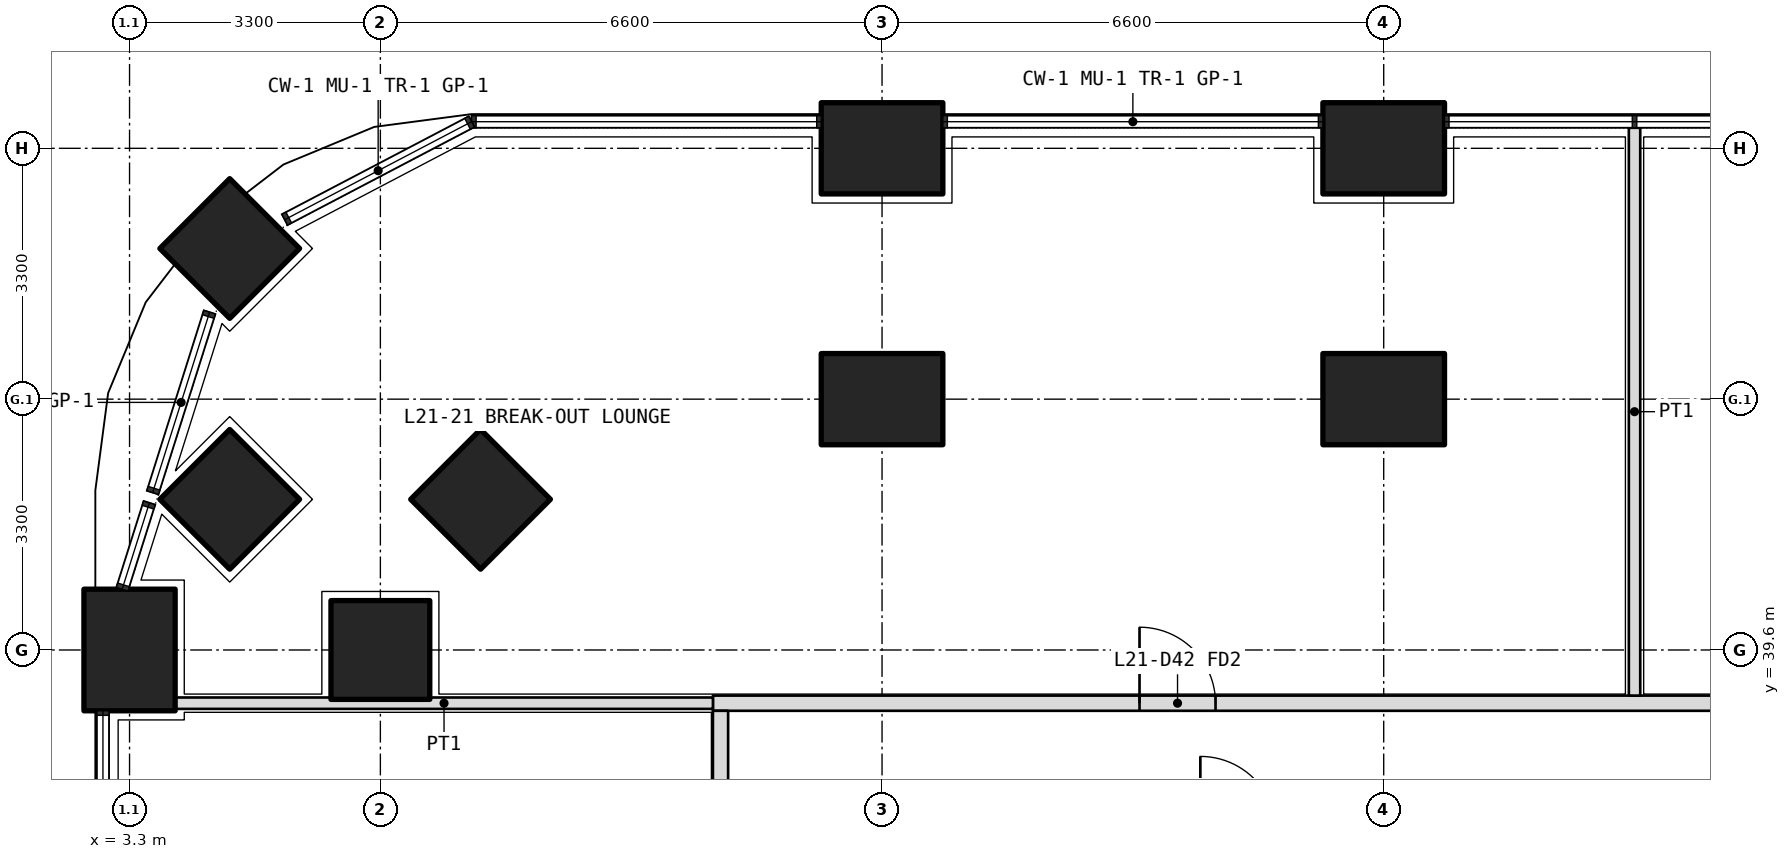
"""IFC4 building model, lengths in metres.
Left out: names, types, materials, properties, quantities, classifications, styles, units other than length and angle.
Written with IfcOpenShell. Run it as: python <this file> out.ifc"""

import sys

from ifc_helpers import new_model, si_unit, direction, frame, frame_2d, origin, origin_2d, place, context, subcontext, project, spatial, rectangle, extrude, element, fill, save


model = new_model("IFC4")
c1 = context("Model", 3, precision=1e-05, world=origin(), true_north=direction((0.0, 1.0)))
c2 = subcontext(c1, "Body", "Model", "MODEL_VIEW")
j1 = project(units=[si_unit("LENGTHUNIT", "METRE"), si_unit("PLANEANGLEUNIT", "RADIAN")], contexts=[c1])
p1 = place(None, origin())
s1 = spatial("IfcSite", under=j1, at=p1, CompositionType="ELEMENT")
p2 = place(p1, origin())
s2 = spatial("IfcBuilding", under=s1, at=p2, CompositionType="ELEMENT")
p3 = place(p2, frame((0.0, 0.0, 94.8)))
s3 = spatial("IfcBuildingStorey", under=s2, at=p3, CompositionType="ELEMENT", Elevation=94.8)
p4 = place(p3, frame((4.618, 44.882, 0.0), z_axis=(0.0, 0.0, 1.0), x_axis=(0.707106781187, 0.707106781187, 0.0)))
e1 = element("IfcColumn", 1, at=p4, inside=s3, PredefinedType="COLUMN", context=c2, shape_type="SweptSolid", body=[
    extrude(rectangle(XDim=1.3, YDim=1.3, at=origin_2d()), origin(), (0.0, 0.0, 1.0), 4.2),
])
for number, where, z_axis, x_axis in (
    (2, (3.3, 39.6, 0.0), (0.0, 0.0, 1.0), (0.0, 1.0, 0.0)),
    (3, (13.2, 46.2, 0.0), (0.0, 0.0, 1.0), (1.0, 0.0, 0.0)),
    (4, (19.8, 46.2, 0.0), (0.0, 0.0, 1.0), (1.0, 0.0, 0.0)),
):
    element("IfcColumn", number, at=place(p3, frame(where, z_axis=z_axis, x_axis=x_axis)), inside=s3, PredefinedType="COLUMN", context=c2, shape_type="SweptSolid", body=[
        extrude(rectangle(XDim=1.6, YDim=1.2, at=origin_2d()), origin(), (0.0, 0.0, 1.0), 4.2),
    ])
for number, where, z_axis, x_axis in (
    (5, (6.6, 39.6, 0.0), (0.0, 0.0, 1.0), (1.0, 0.0, 0.0)),
    (6, (4.618, 41.582, 0.0), (0.0, 0.0, 1.0), (0.707, 0.707, 0.0)),
):
    element("IfcColumn", number, at=place(p3, frame(where, z_axis=z_axis, x_axis=x_axis)), inside=s3, PredefinedType="COLUMN", context=c2, shape_type="SweptSolid", body=[
        extrude(rectangle(XDim=1.3, YDim=1.3, at=origin_2d()), origin(), (0.0, 0.0, 1.0), 4.2),
    ])
for number, where, z_axis, x_axis in (
    (7, (13.2, 42.9, 0.0), (0.0, 0.0, 1.0), (1.0, 0.0, 0.0)),
    (8, (19.8, 42.9, 0.0), (0.0, 0.0, 1.0), (1.0, 0.0, 0.0)),
):
    element("IfcColumn", number, at=place(p3, frame(where, z_axis=z_axis, x_axis=x_axis)), inside=s3, PredefinedType="COLUMN", context=c2, shape_type="SweptSolid", body=[
        extrude(rectangle(XDim=1.6, YDim=1.2, at=origin_2d()), origin(), (0.0, 0.0, 1.0), 4.2),
    ])
p5 = place(p3, frame((7.918, 41.582, 0.0), z_axis=(0.0, 0.0, 1.0), x_axis=(0.707106781187, 0.707106781187, 0.0)))
e9 = element("IfcColumn", 9, at=p5, inside=s3, PredefinedType="COLUMN", context=c2, shape_type="SweptSolid", body=[
    extrude(rectangle(XDim=1.3, YDim=1.3, at=origin_2d()), origin(), (0.0, 0.0, 1.0), 4.2),
])
p6 = place(p3, frame((10.975, 38.9, 0.0), z_axis=(0.0, 0.0, 1.0), x_axis=(1.0, 0.0, 0.0)))
e10 = element("IfcWall", 10, at=p6, inside=s3, PredefinedType="PARTITIONING", context=c2, shape_type="SweptSolid", body=[
    extrude(rectangle(XDim=30.85, YDim=0.2, at=frame_2d((15.425, 0.0))), origin(), (0.0, 0.0, 1.0), 2.85),
])
p7 = place(p6, frame((5.613, 0.0, 0.0)))
e11 = element("IfcOpeningElement", 11, at=p7, cuts=e10, PredefinedType="OPENING", context=c2, shape_type="SweptSolid", body=[
    extrude(rectangle(XDim=1.0, YDim=2.1, at=frame_2d((0.5, 1.05))), frame((0.0, 0.11, 0.0), z_axis=(0.0, -1.0, 0.0), x_axis=(1.0, 0.0, 0.0)), (0.0, 0.0, 1.0), 0.22),
])
p8 = place(p6, frame((16.575, 0.0, 0.0)))
e12 = element("IfcOpeningElement", 12, at=p8, cuts=e10, PredefinedType="OPENING", context=c2, shape_type="SweptSolid", body=[
    extrude(rectangle(XDim=1.0, YDim=2.1, at=frame_2d((0.5, 1.05))), frame((0.0, 0.11, 0.0), z_axis=(0.0, -1.0, 0.0), x_axis=(1.0, 0.0, 0.0)), (0.0, 0.0, 1.0), 0.22),
])
p9 = place(p6, frame((23.175, 0.0, 0.0)))
e13 = element("IfcOpeningElement", 13, at=p9, cuts=e10, PredefinedType="OPENING", context=c2, shape_type="SweptSolid", body=[
    extrude(rectangle(XDim=1.0, YDim=2.1, at=frame_2d((0.5, 1.05))), frame((0.0, 0.11, 0.0), z_axis=(0.0, -1.0, 0.0), x_axis=(1.0, 0.0, 0.0)), (0.0, 0.0, 1.0), 0.22),
])
p10 = place(p6, frame((27.538, 0.0, 0.0)))
e14 = element("IfcOpeningElement", 14, at=p10, cuts=e10, PredefinedType="OPENING", context=c2, shape_type="SweptSolid", body=[
    extrude(rectangle(XDim=1.0, YDim=2.1, at=frame_2d((0.5, 1.05))), frame((0.0, 0.11, 0.0), z_axis=(0.0, -1.0, 0.0), x_axis=(1.0, 0.0, 0.0)), (0.0, 0.0, 1.0), 0.22),
])
p11 = place(p3, frame((11.075, 11.175, 0.0), z_axis=(0.0, 0.0, 1.0), x_axis=(0.0, 1.0, 0.0)))
e15 = element("IfcWall", 15, at=p11, inside=s3, PredefinedType="PARTITIONING", context=c2, shape_type="SweptSolid", body=[
    extrude(rectangle(XDim=27.625, YDim=0.2, at=frame_2d((13.812, 0.0))), origin(), (0.0, 0.0, 1.0), 2.85),
])
p12 = place(p11, frame((0.462, 0.0, 0.0)))
e16 = element("IfcOpeningElement", 16, at=p12, cuts=e15, PredefinedType="OPENING", context=c2, shape_type="SweptSolid", body=[
    extrude(rectangle(XDim=1.0, YDim=2.1, at=frame_2d((0.5, 1.05))), frame((0.0, 0.11, 0.0), z_axis=(0.0, -1.0, 0.0), x_axis=(1.0, 0.0, 0.0)), (0.0, 0.0, 1.0), 0.22),
])
p13 = place(p11, frame((2.575, 0.0, 0.0)))
e17 = element("IfcOpeningElement", 17, at=p13, cuts=e15, PredefinedType="OPENING", context=c2, shape_type="SweptSolid", body=[
    extrude(rectangle(XDim=1.0, YDim=2.1, at=frame_2d((0.5, 1.05))), frame((0.0, 0.11, 0.0), z_axis=(0.0, -1.0, 0.0), x_axis=(1.0, 0.0, 0.0)), (0.0, 0.0, 1.0), 0.22),
])
p14 = place(p11, frame((5.65, 0.0, 0.0)))
e18 = element("IfcOpeningElement", 18, at=p14, cuts=e15, PredefinedType="OPENING", context=c2, shape_type="SweptSolid", body=[
    extrude(rectangle(XDim=0.9, YDim=2.1, at=frame_2d((0.45, 1.05))), frame((0.0, 0.11, 0.0), z_axis=(0.0, -1.0, 0.0), x_axis=(1.0, 0.0, 0.0)), (0.0, 0.0, 1.0), 0.22),
])
p15 = place(p11, frame((9.5, 0.0, 0.0)))
e19 = element("IfcOpeningElement", 19, at=p15, cuts=e15, PredefinedType="OPENING", context=c2, shape_type="SweptSolid", body=[
    extrude(rectangle(XDim=0.9, YDim=2.1, at=frame_2d((0.45, 1.05))), frame((0.0, 0.11, 0.0), z_axis=(0.0, -1.0, 0.0), x_axis=(1.0, 0.0, 0.0)), (0.0, 0.0, 1.0), 0.22),
])
p16 = place(p11, frame((13.025, 0.0, 0.0)))
e20 = element("IfcOpeningElement", 20, at=p16, cuts=e15, PredefinedType="OPENING", context=c2, shape_type="SweptSolid", body=[
    extrude(rectangle(XDim=1.0, YDim=2.1, at=frame_2d((0.5, 1.05))), frame((0.0, 0.11, 0.0), z_axis=(0.0, -1.0, 0.0), x_axis=(1.0, 0.0, 0.0)), (0.0, 0.0, 1.0), 0.22),
])
p17 = place(p11, frame((20.975, 0.0, 0.0)))
e21 = element("IfcOpeningElement", 21, at=p17, cuts=e15, PredefinedType="OPENING", context=c2, shape_type="SweptSolid", body=[
    extrude(rectangle(XDim=1.0, YDim=2.1, at=frame_2d((0.5, 1.05))), frame((0.0, 0.11, 0.0), z_axis=(0.0, -1.0, 0.0), x_axis=(1.0, 0.0, 0.0)), (0.0, 0.0, 1.0), 0.22),
])
p18 = place(p3, frame((3.9, 38.9, 0.0), z_axis=(0.0, 0.0, 1.0), x_axis=(1.0, 0.0, 0.0)))
e22 = element("IfcWall", 22, at=p18, inside=s3, PredefinedType="PARTITIONING", context=c2, shape_type="SweptSolid", body=[
    extrude(rectangle(XDim=7.075, YDim=0.15, at=frame_2d((3.538, 0.0))), origin(), (0.0, 0.0, 1.0), 2.85),
])
p19 = place(p3, frame((23.1, 46.47, 0.0), z_axis=(0.0, 0.0, 1.0), x_axis=(0.0, -1.0, 0.0)))
e23 = element("IfcWall", 23, at=p19, inside=s3, PredefinedType="PARTITIONING", context=c2, shape_type="SweptSolid", body=[
    extrude(rectangle(XDim=7.47, YDim=0.15, at=frame_2d((3.735, 0.0))), origin(), (0.0, 0.0, 1.0), 2.7),
])
p20 = place(p7, origin())
e24 = element("IfcDoor", 24, at=p20, inside=s3, OperationType="SINGLE_SWING_LEFT", PredefinedType="DOOR", context=c2, shape_type="SweptSolid", body=[
    extrude(rectangle(XDim=1.0, YDim=2.1, at=frame_2d((0.5, 1.05))), frame((0.0, 0.025, 0.0), z_axis=(0.0, -1.0, 0.0), x_axis=(1.0, 0.0, 0.0)), (0.0, 0.0, 1.0), 0.05),
])
fill(e11, e24)
save(model, sys.argv[1])
